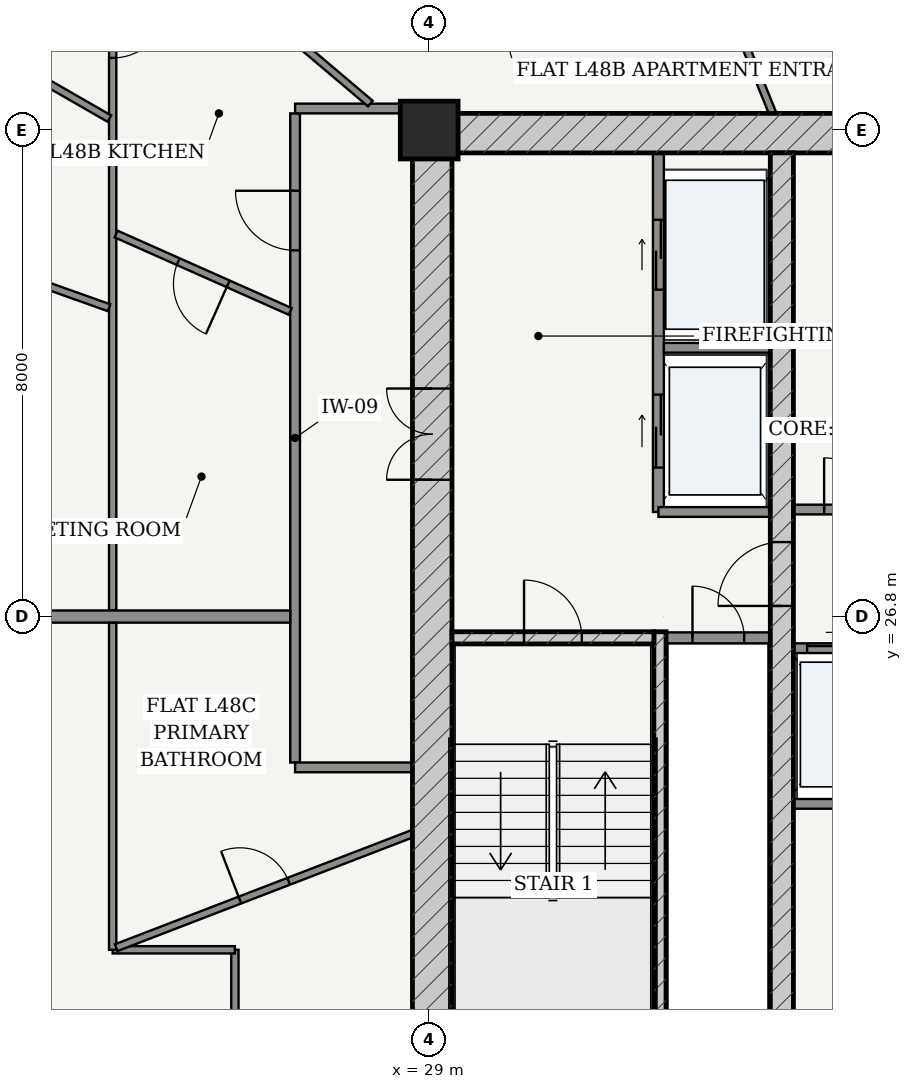
"""IFC4 building model, lengths in metres.
Left out: names, types, materials, properties, quantities, classifications, styles, units other than length and angle.
Written with IfcOpenShell. Run it as: python <this file> out.ifc"""

import sys

from ifc_helpers import new_model, si_unit, direction, frame, frame_2d, origin, origin_2d, place, context, subcontext, project, spatial, rectangle, extrude, source, transform, mapped, element, fill, save


model = new_model("IFC4")
c1 = context("Model", 3, precision=1e-05, world=origin(), true_north=direction((-0.2419218956, 0.970295726276)))
c2 = subcontext(c1, "Body", "Model", "MODEL_VIEW")
j1 = project(units=[si_unit("LENGTHUNIT", "METRE"), si_unit("PLANEANGLEUNIT", "RADIAN")], contexts=[c1])
p1 = place(None, origin())
s1 = spatial("IfcSite", under=j1, at=p1, CompositionType="ELEMENT")
p2 = place(p1, origin())
s2 = spatial("IfcBuilding", under=s1, at=p2, CompositionType="ELEMENT")
p3 = place(p2, frame((0.0, 0.0, 182.2)))
s3 = spatial("IfcBuildingStorey", under=s2, at=p3, CompositionType="ELEMENT", Elevation=182.2)
p4 = place(p3, frame((29.0, 34.8, 0.0), z_axis=(0.0, 0.0, 1.0), x_axis=(1.0, 0.0, 0.0)))
e1 = element("IfcColumn", 1, at=p4, inside=s3, PredefinedType="COLUMN", context=c2, shape_type="SweptSolid", body=[
    extrude(rectangle(XDim=0.95, YDim=0.95, at=origin_2d()), origin(), (0.0, 0.0, 1.0), 3.6),
])
p5 = place(p3, frame((28.725, 34.75, 0.0), z_axis=(0.0, 0.0, 1.0), x_axis=(1.0, 0.0, 0.0)))
e2 = element("IfcWall", 2, at=p5, inside=s3, PredefinedType="SHEAR", context=c2, shape_type="SweptSolid", body=[
    extrude(rectangle(XDim=18.55, YDim=0.65, at=frame_2d((9.275, 0.0))), origin(), (0.0, 0.0, 1.0), 3.15),
])
p6 = place(p3, frame((29.05, 19.175, 0.0), z_axis=(0.0, 0.0, 1.0), x_axis=(0.0, 1.0, 0.0)))
e3 = element("IfcWall", 3, at=p6, inside=s3, PredefinedType="SHEAR", context=c2, shape_type="SweptSolid", body=[
    extrude(rectangle(XDim=15.25, YDim=0.65, at=frame_2d((7.625, 0.0))), origin(), (0.0, 0.0, 1.0), 3.15),
])
p7 = place(p6, frame((9.875, 0.0, 0.0)))
e4 = element("IfcOpeningElement", 4, at=p7, cuts=e3, PredefinedType="OPENING", context=c2, shape_type="SweptSolid", body=[
    extrude(rectangle(XDim=1.5, YDim=2.2, at=frame_2d((0.75, 1.1))), frame((0.0, 0.335, 0.0), z_axis=(0.0, -1.0, 0.0), x_axis=(1.0, 0.0, 0.0)), (0.0, 0.0, 1.0), 0.67),
])
p8 = place(p3, frame((32.795, 19.175, 0.0), z_axis=(0.0, 0.0, 1.0), x_axis=(0.0, 1.0, 0.0)))
e5 = element("IfcWall", 5, at=p8, inside=s3, PredefinedType="SOLIDWALL", context=c2, shape_type="SweptSolid", body=[
    extrude(rectangle(XDim=7.375, YDim=0.2, at=frame_2d((3.688, 0.0))), origin(), (0.0, 0.0, 1.0), 3.15),
])
p9 = place(p3, frame((29.375, 26.45, 0.0), z_axis=(0.0, 0.0, 1.0), x_axis=(1.0, 0.0, 0.0)))
e6 = element("IfcWall", 6, at=p9, inside=s3, PredefinedType="SOLIDWALL", context=c2, shape_type="SweptSolid", body=[
    extrude(rectangle(XDim=3.32, YDim=0.2, at=frame_2d((1.66, 0.0))), origin(), (0.0, 0.0, 1.0), 3.15),
])
p10 = place(p9, frame((1.185, 0.0, 0.0)))
e7 = element("IfcOpeningElement", 7, at=p10, cuts=e6, PredefinedType="OPENING", context=c2, shape_type="SweptSolid", body=[
    extrude(rectangle(XDim=0.95, YDim=2.15, at=frame_2d((0.475, 1.075))), frame((0.0, 0.11, 0.0), z_axis=(0.0, -1.0, 0.0), x_axis=(1.0, 0.0, 0.0)), (0.0, 0.0, 1.0), 0.22),
])
p11 = place(p3, frame((34.8, 19.175, 0.0), z_axis=(0.0, 0.0, 1.0), x_axis=(0.0, 1.0, 0.0)))
e8 = element("IfcWall", 8, at=p11, inside=s3, PredefinedType="SHEAR", context=c2, shape_type="SweptSolid", body=[
    extrude(rectangle(XDim=15.25, YDim=0.38, at=frame_2d((7.625, 0.0))), origin(), (0.0, 0.0, 1.0), 3.15),
])
p12 = place(p11, frame((7.8, 0.0, 0.0)))
e9 = element("IfcOpeningElement", 9, at=p12, cuts=e8, PredefinedType="OPENING", context=c2, shape_type="SweptSolid", body=[
    extrude(rectangle(XDim=1.05, YDim=2.15, at=frame_2d((0.525, 1.075))), frame((0.0, 0.2, 0.0), z_axis=(0.0, -1.0, 0.0), x_axis=(1.0, 0.0, 0.0)), (0.0, 0.0, 1.0), 0.4),
])
p13 = place(p3, frame((32.9, 26.45, 0.0), z_axis=(0.0, 0.0, 1.0), x_axis=(1.0, 0.0, 0.0)))
e10 = element("IfcWall", 10, at=p13, inside=s3, PredefinedType="PARTITIONING", context=c2, shape_type="SweptSolid", body=[
    extrude(rectangle(XDim=1.71, YDim=0.18, at=frame_2d((0.855, 0.0))), origin(), (0.0, 0.0, 1.0), 3.15),
])
p14 = place(p13, frame((0.43, 0.0, 0.0)))
e11 = element("IfcOpeningElement", 11, at=p14, cuts=e10, PredefinedType="OPENING", context=c2, shape_type="SweptSolid", body=[
    extrude(rectangle(XDim=0.85, YDim=2.1, at=frame_2d((0.425, 1.05))), frame((0.0, 0.1, 0.0), z_axis=(0.0, -1.0, 0.0), x_axis=(1.0, 0.0, 0.0)), (0.0, 0.0, 1.0), 0.2),
])
p15 = place(p3, frame((32.77, 28.52, 0.0), z_axis=(0.0, 0.0, 1.0), x_axis=(0.0, 1.0, 0.0)))
e12 = element("IfcWall", 12, at=p15, inside=s3, PredefinedType="PARTITIONING", context=c2, shape_type="SweptSolid", body=[
    extrude(rectangle(XDim=5.905, YDim=0.18, at=frame_2d((2.953, 0.0))), origin(), (0.0, 0.0, 1.0), 3.15),
])
p16 = place(p15, frame((3.655, 0.0, 0.0)))
e13 = element("IfcOpeningElement", 13, at=p16, cuts=e12, PredefinedType="OPENING", context=c2, shape_type="SweptSolid", body=[
    extrude(rectangle(XDim=1.15, YDim=2.2, at=frame_2d((0.575, 1.1))), frame((0.0, 0.1, 0.0), z_axis=(0.0, -1.0, 0.0), x_axis=(1.0, 0.0, 0.0)), (0.0, 0.0, 1.0), 0.2),
])
p17 = place(p15, frame((0.73, 0.0, 0.0)))
e14 = element("IfcOpeningElement", 14, at=p17, cuts=e12, PredefinedType="OPENING", context=c2, shape_type="SweptSolid", body=[
    extrude(rectangle(XDim=1.2, YDim=2.25, at=frame_2d((0.6, 1.125))), frame((0.0, 0.1, 0.0), z_axis=(0.0, -1.0, 0.0), x_axis=(1.0, 0.0, 0.0)), (0.0, 0.0, 1.0), 0.2),
])
p18 = place(p3, frame((32.86, 31.22, 0.0), z_axis=(0.0, 0.0, 1.0), x_axis=(1.0, 0.0, 0.0)))
e15 = element("IfcWall", 15, at=p18, inside=s3, PredefinedType="PARTITIONING", context=c2, shape_type="SweptSolid", body=[
    extrude(rectangle(XDim=1.75, YDim=0.16, at=frame_2d((0.875, 0.0))), origin(), (0.0, 0.0, 1.0), 3.15),
])
p19 = place(p3, frame((32.77, 28.52, 0.0), z_axis=(0.0, 0.0, 1.0), x_axis=(1.0, 0.0, 0.0)))
e16 = element("IfcWall", 16, at=p19, inside=s3, PredefinedType="PARTITIONING", context=c2, shape_type="SweptSolid", body=[
    extrude(rectangle(XDim=1.84, YDim=0.16, at=frame_2d((0.92, 0.0))), origin(), (0.0, 0.0, 1.0), 3.15),
])
p20 = place(p3, frame((34.99, 28.56, 0.0), z_axis=(0.0, 0.0, 1.0), x_axis=(1.0, 0.0, 0.0)))
e17 = element("IfcWall", 17, at=p20, inside=s3, PredefinedType="PARTITIONING", context=c2, shape_type="SweptSolid", body=[
    extrude(rectangle(XDim=6.02, YDim=0.16, at=frame_2d((3.01, 0.0))), origin(), (0.0, 0.0, 1.0), 3.15),
])
p21 = place(p20, frame((0.505, 0.0, 0.0)))
e18 = element("IfcOpeningElement", 18, at=p21, cuts=e17, PredefinedType="OPENING", context=c2, shape_type="SweptSolid", body=[
    extrude(rectangle(XDim=0.85, YDim=2.1, at=frame_2d((0.425, 1.05))), frame((0.0, 0.09, 0.0), z_axis=(0.0, -1.0, 0.0), x_axis=(1.0, 0.0, 0.0)), (0.0, 0.0, 1.0), 0.18),
])
p22 = place(p20, frame((2.58, 0.0, 0.0)))
e19 = element("IfcOpeningElement", 19, at=p22, cuts=e17, PredefinedType="OPENING", context=c2, shape_type="SweptSolid", body=[
    extrude(rectangle(XDim=0.86, YDim=2.1, at=frame_2d((0.43, 1.05))), frame((0.0, 0.09, 0.0), z_axis=(0.0, -1.0, 0.0), x_axis=(1.0, 0.0, 0.0)), (0.0, 0.0, 1.0), 0.18),
])
p23 = place(p20, frame((4.665, 0.0, 0.0)))
e20 = element("IfcOpeningElement", 20, at=p23, cuts=e17, PredefinedType="OPENING", context=c2, shape_type="SweptSolid", body=[
    extrude(rectangle(XDim=0.85, YDim=2.1, at=frame_2d((0.425, 1.05))), frame((0.0, 0.09, 0.0), z_axis=(0.0, -1.0, 0.0), x_axis=(1.0, 0.0, 0.0)), (0.0, 0.0, 1.0), 0.18),
])
p24 = place(p3, frame((34.99, 26.28, 0.0), z_axis=(0.0, 0.0, 1.0), x_axis=(1.0, 0.0, 0.0)))
e21 = element("IfcWall", 21, at=p24, inside=s3, PredefinedType="PARTITIONING", context=c2, shape_type="SweptSolid", body=[
    extrude(rectangle(XDim=6.02, YDim=0.16, at=frame_2d((3.01, 0.0))), origin(), (0.0, 0.0, 1.0), 3.15),
])
p25 = place(p24, frame((0.225, 0.0, 0.0)))
e22 = element("IfcOpeningElement", 22, at=p25, cuts=e21, PredefinedType="OPENING", context=c2, shape_type="SweptSolid", body=[
    extrude(rectangle(XDim=1.1, YDim=2.2, at=frame_2d((0.55, 1.1))), frame((0.0, 0.09, 0.0), z_axis=(0.0, -1.0, 0.0), x_axis=(1.0, 0.0, 0.0)), (0.0, 0.0, 1.0), 0.18),
])
p26 = place(p24, frame((1.705, 0.0, 0.0)))
e23 = element("IfcOpeningElement", 23, at=p26, cuts=e21, PredefinedType="OPENING", context=c2, shape_type="SweptSolid", body=[
    extrude(rectangle(XDim=1.1, YDim=2.2, at=frame_2d((0.55, 1.1))), frame((0.0, 0.09, 0.0), z_axis=(0.0, -1.0, 0.0), x_axis=(1.0, 0.0, 0.0)), (0.0, 0.0, 1.0), 0.18),
])
p27 = place(p3, frame((34.99, 23.72, 0.0), z_axis=(0.0, 0.0, 1.0), x_axis=(1.0, 0.0, 0.0)))
e24 = element("IfcWall", 24, at=p27, inside=s3, PredefinedType="PARTITIONING", context=c2, shape_type="SweptSolid", body=[
    extrude(rectangle(XDim=6.02, YDim=0.16, at=frame_2d((3.01, 0.0))), origin(), (0.0, 0.0, 1.0), 3.15),
])
p28 = place(p3, frame((26.795, 24.4, 0.0), z_axis=(0.0, 0.0, 1.0), x_axis=(0.0, 1.0, 0.0)))
e25 = element("IfcWall", 25, at=p28, inside=s3, PredefinedType="PARTITIONING", context=c2, shape_type="SweptSolid", body=[
    extrude(rectangle(XDim=10.675, YDim=0.16, at=frame_2d((5.337, 0.0))), origin(), (0.0, 0.0, 1.0), 2.666),
])
p29 = place(p28, frame((8.422, 0.0, 0.0)))
e26 = element("IfcOpeningElement", 26, at=p29, cuts=e25, PredefinedType="OPENING", context=c2, shape_type="SweptSolid", body=[
    extrude(rectangle(XDim=0.98, YDim=2.2, at=frame_2d((0.49, 1.1))), frame((0.0, 0.09, 0.0), z_axis=(0.0, -1.0, 0.0), x_axis=(1.0, 0.0, 0.0)), (0.0, 0.0, 1.0), 0.18),
])
for number, where, z_axis, x_axis in (
    (27, (26.795, 35.155, 0.0), (0.0, 0.0, 1.0), (1.0, 0.0, 0.0)),
    (28, (26.795, 24.32, 0.0), (0.0, 0.0, 1.0), (1.0, 0.0, 0.0)),
):
    element("IfcWall", number, at=place(p3, frame(where, z_axis=z_axis, x_axis=x_axis)), inside=s3, PredefinedType="PARTITIONING", context=c2, shape_type="SweptSolid", body=[
        extrude(rectangle(XDim=1.93, YDim=0.16, at=frame_2d((0.965, 0.0))), origin(), (0.0, 0.0, 1.0), 3.15),
    ])
p30 = place(p3, frame((23.795, 26.902, 0.0), z_axis=(0.0, 0.0, 1.0), x_axis=(0.0, 1.0, 0.0)))
e29 = element("IfcWall", 29, at=p30, inside=s3, PredefinedType="PARTITIONING", context=c2, shape_type="SweptSolid", body=[
    extrude(rectangle(XDim=11.253, YDim=0.12, at=frame_2d((5.626, 0.0))), origin(), (0.0, 0.0, 1.0), 2.666),
])
p31 = place(p30, frame((9.085, 0.0, 0.0)))
e30 = element("IfcOpeningElement", 30, at=p31, cuts=e29, PredefinedType="OPENING", context=c2, shape_type="SweptSolid", body=[
    extrude(rectangle(XDim=0.9, YDim=2.15, at=frame_2d((0.45, 1.075))), frame((0.0, 0.07, 0.0), z_axis=(0.0, -1.0, 0.0), x_axis=(1.0, 0.0, 0.0)), (0.0, 0.0, 1.0), 0.14),
])
p32 = place(p3, frame((23.741, 34.989, 0.0), z_axis=(0.0, 0.0, 1.0), x_axis=(-0.867167953258, 0.498015803808, 0.0)))
e31 = element("IfcWall", 31, at=p32, inside=s3, PredefinedType="PARTITIONING", context=c2, shape_type="SweptSolid", body=[
    extrude(rectangle(XDim=6.65, YDim=0.12, at=frame_2d((3.325, 0.0))), origin(), (0.0, 0.0, 1.0), 2.5),
])
p33 = place(p32, frame((1.873, 0.0, 0.0)))
e32 = element("IfcOpeningElement", 32, at=p33, cuts=e31, PredefinedType="OPENING", context=c2, shape_type="SweptSolid", body=[
    extrude(rectangle(XDim=0.9, YDim=2.15, at=frame_2d((0.45, 1.075))), frame((0.0, 0.07, 0.0), z_axis=(0.0, -1.0, 0.0), x_axis=(1.0, 0.0, 0.0)), (0.0, 0.0, 1.0), 0.14),
])
p34 = place(p3, frame((23.737, 31.878, 0.0), z_axis=(0.0, 0.0, 1.0), x_axis=(-0.942071057968, 0.335413359512, 0.0)))
e33 = element("IfcWall", 33, at=p34, inside=s3, PredefinedType="PARTITIONING", context=c2, shape_type="SweptSolid", body=[
    extrude(rectangle(XDim=8.53, YDim=0.12, at=frame_2d((4.265, 0.0))), origin(), (0.0, 0.0, 1.0), 2.666),
])
p35 = place(p34, frame((3.815, 0.0, 0.0)))
e34 = element("IfcOpeningElement", 34, at=p35, cuts=e33, PredefinedType="OPENING", context=c2, shape_type="SweptSolid", body=[
    extrude(rectangle(XDim=0.9, YDim=2.15, at=frame_2d((0.45, 1.075))), frame((0.0, 0.07, 0.0), z_axis=(0.0, -1.0, 0.0), x_axis=(1.0, 0.0, 0.0)), (0.0, 0.0, 1.0), 0.14),
])
p36 = place(p3, frame((34.649, 35.075, 0.0), z_axis=(0.0, 0.0, 1.0), x_axis=(-0.375339921816, 0.926887233212, 0.0)))
e35 = element("IfcWall", 35, at=p36, inside=s3, PredefinedType="PARTITIONING", context=c2, shape_type="SweptSolid", body=[
    extrude(rectangle(XDim=3.088, YDim=0.12, at=frame_2d((1.544, 0.0))), origin(), (0.0, 0.0, 1.0), 3.15),
])
p37 = place(p3, frame((28.032, 35.236, 0.0), z_axis=(0.0, 0.0, 1.0), x_axis=(-0.763321857138, 0.646018376221, 0.0)))
e36 = element("IfcWall", 36, at=p37, inside=s3, PredefinedType="PARTITIONING", context=c2, shape_type="SweptSolid", body=[
    extrude(rectangle(XDim=4.456, YDim=0.12, at=frame_2d((2.228, 0.0))), origin(), (0.0, 0.0, 1.0), 2.825),
])
p38 = place(p3, frame((26.715, 31.818, 0.0), z_axis=(0.0, 0.0, 1.0), x_axis=(-0.913750499147, 0.406275799561, 0.0)))
e37 = element("IfcWall", 37, at=p38, inside=s3, PredefinedType="PARTITIONING", context=c2, shape_type="SweptSolid", body=[
    extrude(rectangle(XDim=3.134, YDim=0.12, at=frame_2d((1.567, 0.0))), origin(), (0.0, 0.0, 1.0), 2.825),
])
p39 = place(p38, frame((1.117, 0.0, 0.0)))
e38 = element("IfcOpeningElement", 38, at=p39, cuts=e37, PredefinedType="OPENING", context=c2, shape_type="SweptSolid", body=[
    extrude(rectangle(XDim=0.9, YDim=2.15, at=frame_2d((0.45, 1.075))), frame((0.0, 0.07, 0.0), z_axis=(0.0, -1.0, 0.0), x_axis=(1.0, 0.0, 0.0)), (0.0, 0.0, 1.0), 0.14),
])
p40 = place(p3, frame((26.715, 26.8, 0.0), z_axis=(0.0, 0.0, 1.0), x_axis=(-1.0, 0.0, 0.0)))
e39 = element("IfcWall", 39, at=p40, inside=s3, PredefinedType="PARTITIONING", context=c2, shape_type="SweptSolid", body=[
    extrude(rectangle(XDim=12.855, YDim=0.2, at=frame_2d((6.427, 0.0))), origin(), (0.0, 0.0, 1.0), 2.666),
])
p41 = place(p3, frame((25.805, 15.605, 0.0), z_axis=(0.0, 0.0, 1.0), x_axis=(0.0, 1.0, 0.0)))
e40 = element("IfcWall", 40, at=p41, inside=s3, PredefinedType="PARTITIONING", context=c2, shape_type="SweptSolid", body=[
    extrude(rectangle(XDim=5.715, YDim=0.12, at=frame_2d((2.857, 0.0))), origin(), (0.0, 0.0, 1.0), 2.666),
])
p42 = place(p3, frame((25.805, 21.32, 0.0), z_axis=(0.0, 0.0, 1.0), x_axis=(-1.0, 0.0, 0.0)))
e41 = element("IfcWall", 41, at=p42, inside=s3, PredefinedType="PARTITIONING", context=c2, shape_type="SweptSolid", body=[
    extrude(rectangle(XDim=2.01, YDim=0.12, at=frame_2d((1.005, 0.0))), origin(), (0.0, 0.0, 1.0), 2.825),
])
p43 = place(p3, frame((23.795, 21.32, 0.0), z_axis=(0.0, 0.0, 1.0), x_axis=(0.0, 1.0, 0.0)))
e42 = element("IfcWall", 42, at=p43, inside=s3, PredefinedType="PARTITIONING", context=c2, shape_type="SweptSolid", body=[
    extrude(rectangle(XDim=5.378, YDim=0.12, at=frame_2d((2.689, 0.0))), origin(), (0.0, 0.0, 1.0), 2.666),
])
p44 = place(p3, frame((28.723, 23.229, 0.0), z_axis=(0.0, 0.0, 1.0), x_axis=(-0.933262385607, -0.359195378048, 0.0)))
e43 = element("IfcWall", 43, at=p44, inside=s3, PredefinedType="PARTITIONING", context=c2, shape_type="SweptSolid", body=[
    extrude(rectangle(XDim=5.219, YDim=0.12, at=frame_2d((2.609, 0.0))), origin(), (0.0, 0.0, 1.0), 2.825),
])
p45 = place(p44, frame((2.179, 0.0, 0.0)))
e44 = element("IfcOpeningElement", 44, at=p45, cuts=e43, PredefinedType="OPENING", context=c2, shape_type="SweptSolid", body=[
    extrude(rectangle(XDim=0.86, YDim=2.15, at=frame_2d((0.43, 1.075))), frame((0.0, 0.07, 0.0), z_axis=(0.0, -1.0, 0.0), x_axis=(1.0, 0.0, 0.0)), (0.0, 0.0, 1.0), 0.14),
])
m1 = source(origin(), c2, "Body", "SweptSolid", [
    extrude(rectangle(XDim=1.5, YDim=2.2, at=frame_2d((0.75, 1.1))), frame((0.0, 0.025, 0.0), z_axis=(0.0, -1.0, 0.0), x_axis=(1.0, 0.0, 0.0)), (0.0, 0.0, 1.0), 0.05),
])
p46 = place(p7, origin())
e45 = element("IfcDoor", 45, at=p46, inside=s3, OperationType="DOUBLE_DOOR_SINGLE_SWING", PredefinedType="DOOR", context=c2, shape_type="MappedRepresentation", body=[
    mapped(m1, transform((0.0, 0.0, 0.0), scale=1.0)),
])
fill(e4, e45)
m2 = source(origin(), c2, "Body", "SweptSolid", [
    extrude(rectangle(XDim=1.05, YDim=2.15, at=frame_2d((0.525, 1.075))), frame((0.0, 0.025, 0.0), z_axis=(0.0, -1.0, 0.0), x_axis=(1.0, 0.0, 0.0)), (0.0, 0.0, 1.0), 0.05),
])
p47 = place(p12, origin())
e46 = element("IfcDoor", 46, at=p47, inside=s3, OperationType="SINGLE_SWING_LEFT", PredefinedType="DOOR", context=c2, shape_type="MappedRepresentation", body=[
    mapped(m2, transform((0.0, 0.0, 0.0), scale=1.0)),
])
fill(e9, e46)
m3 = source(origin(), c2, "Body", "SweptSolid", [
    extrude(rectangle(XDim=0.95, YDim=2.15, at=frame_2d((0.475, 1.075))), frame((0.0, 0.025, 0.0), z_axis=(0.0, -1.0, 0.0), x_axis=(1.0, 0.0, 0.0)), (0.0, 0.0, 1.0), 0.05),
])
p48 = place(p10, origin())
e47 = element("IfcDoor", 47, at=p48, inside=s3, OperationType="SINGLE_SWING_LEFT", PredefinedType="DOOR", context=c2, shape_type="MappedRepresentation", body=[
    mapped(m3, transform((0.0, 0.0, 0.0), scale=1.0)),
])
fill(e7, e47)
m4 = source(origin(), c2, "Body", "SweptSolid", [
    extrude(rectangle(XDim=0.85, YDim=2.1, at=frame_2d((0.425, 1.05))), frame((0.0, 0.025, 0.0), z_axis=(0.0, -1.0, 0.0), x_axis=(1.0, 0.0, 0.0)), (0.0, 0.0, 1.0), 0.05),
])
p49 = place(p14, origin())
e48 = element("IfcDoor", 48, at=p49, inside=s3, OperationType="SINGLE_SWING_LEFT", PredefinedType="DOOR", context=c2, shape_type="MappedRepresentation", body=[
    mapped(m4, transform((0.0, 0.0, 0.0), scale=1.0)),
])
fill(e11, e48)
p50 = place(p21, origin())
e49 = element("IfcDoor", 49, at=p50, inside=s3, OperationType="SINGLE_SWING_LEFT", PredefinedType="DOOR", context=c2, shape_type="MappedRepresentation", body=[
    mapped(m4, transform((0.0, 0.0, 0.0), scale=1.0)),
])
fill(e18, e49)
m5 = source(origin(), c2, "Body", "SweptSolid", [
    extrude(rectangle(XDim=1.15, YDim=2.2, at=frame_2d((0.575, 1.1))), frame((0.0, 0.025, 0.0), z_axis=(0.0, -1.0, 0.0), x_axis=(1.0, 0.0, 0.0)), (0.0, 0.0, 1.0), 0.05),
])
p51 = place(p16, origin())
e50 = element("IfcDoor", 50, at=p51, inside=s3, OperationType="DOUBLE_DOOR_SLIDING", PredefinedType="DOOR", context=c2, shape_type="MappedRepresentation", body=[
    mapped(m5, transform((0.0, 0.0, 0.0), scale=1.0)),
])
fill(e13, e50)
m6 = source(origin(), c2, "Body", "SweptSolid", [
    extrude(rectangle(XDim=1.2, YDim=2.25, at=frame_2d((0.6, 1.125))), frame((0.0, 0.025, 0.0), z_axis=(0.0, -1.0, 0.0), x_axis=(1.0, 0.0, 0.0)), (0.0, 0.0, 1.0), 0.05),
])
p52 = place(p17, origin())
e51 = element("IfcDoor", 51, at=p52, inside=s3, OperationType="DOUBLE_DOOR_SLIDING", PredefinedType="DOOR", context=c2, shape_type="MappedRepresentation", body=[
    mapped(m6, transform((0.0, 0.0, 0.0), scale=1.0)),
])
fill(e14, e51)
m7 = source(origin(), c2, "Body", "SweptSolid", [
    extrude(rectangle(XDim=1.1, YDim=2.2, at=frame_2d((0.55, 1.1))), frame((0.0, 0.025, 0.0), z_axis=(0.0, -1.0, 0.0), x_axis=(1.0, 0.0, 0.0)), (0.0, 0.0, 1.0), 0.05),
])
p53 = place(p25, origin())
e52 = element("IfcDoor", 52, at=p53, inside=s3, OperationType="DOUBLE_DOOR_SLIDING", PredefinedType="DOOR", context=c2, shape_type="MappedRepresentation", body=[
    mapped(m7, transform((0.0, 0.0, 0.0), scale=1.0)),
])
fill(e22, e52)
m8 = source(origin(), c2, "Body", "SweptSolid", [
    extrude(rectangle(XDim=0.98, YDim=2.2, at=frame_2d((0.49, 1.1))), frame((0.0, 0.025, 0.0), z_axis=(0.0, -1.0, 0.0), x_axis=(1.0, 0.0, 0.0)), (0.0, 0.0, 1.0), 0.05),
])
p54 = place(p29, origin())
e53 = element("IfcDoor", 53, at=p54, inside=s3, OperationType="SINGLE_SWING_RIGHT", PredefinedType="DOOR", context=c2, shape_type="MappedRepresentation", body=[
    mapped(m8, transform((0.0, 0.0, 0.0), scale=1.0)),
])
fill(e26, e53)
m9 = source(origin(), c2, "Body", "SweptSolid", [
    extrude(rectangle(XDim=0.9, YDim=2.15, at=frame_2d((0.45, 1.075))), frame((0.0, 0.025, 0.0), z_axis=(0.0, -1.0, 0.0), x_axis=(1.0, 0.0, 0.0)), (0.0, 0.0, 1.0), 0.05),
])
p55 = place(p31, frame((0.9, 0.0, 0.0), z_axis=(0.0, 0.0, 1.0), x_axis=(-1.0, 0.0, 0.0)))
e54 = element("IfcDoor", 54, at=p55, inside=s3, OperationType="SINGLE_SWING_LEFT", PredefinedType="DOOR", context=c2, shape_type="MappedRepresentation", body=[
    mapped(m9, transform((0.0, 0.0, 0.0), scale=1.0)),
])
fill(e30, e54)
p56 = place(p39, origin())
e55 = element("IfcDoor", 55, at=p56, inside=s3, OperationType="SINGLE_SWING_LEFT", PredefinedType="DOOR", context=c2, shape_type="MappedRepresentation", body=[
    mapped(m9, transform((0.0, 0.0, 0.0), scale=1.0)),
])
fill(e38, e55)
m10 = source(origin(), c2, "Body", "SweptSolid", [
    extrude(rectangle(XDim=0.86, YDim=2.15, at=frame_2d((0.43, 1.075))), frame((0.0, 0.025, 0.0), z_axis=(0.0, -1.0, 0.0), x_axis=(1.0, 0.0, 0.0)), (0.0, 0.0, 1.0), 0.05),
])
p57 = place(p45, frame((0.86, 0.0, 0.0), z_axis=(0.0, 0.0, 1.0), x_axis=(-1.0, 0.0, 0.0)))
e56 = element("IfcDoor", 56, at=p57, inside=s3, OperationType="SINGLE_SWING_LEFT", PredefinedType="DOOR", context=c2, shape_type="MappedRepresentation", body=[
    mapped(m10, transform((0.0, 0.0, 0.0), scale=1.0)),
])
fill(e44, e56)
save(model, sys.argv[1])
